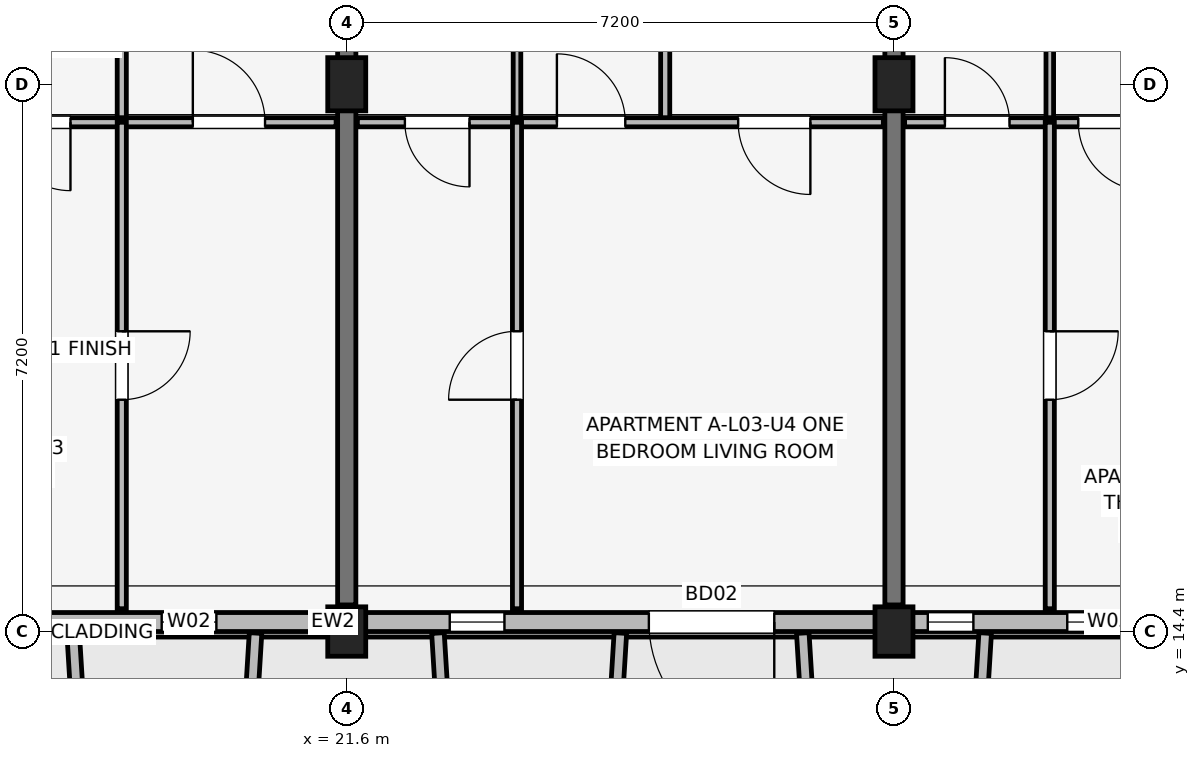
"""IFC4 building model, lengths in metres.
Left out: names, types, materials, properties, quantities, classifications, styles, units other than length and angle.
Written with IfcOpenShell. Run it as: python <this file> out.ifc"""

import sys

from ifc_helpers import new_model, si_unit, direction, frame, frame_2d, origin, origin_2d, place, context, subcontext, project, spatial, rectangle, extrude, element, fill, save


model = new_model("IFC4")
c1 = context("Model", 3, precision=1e-05, world=origin(), true_north=direction((0.0, 1.0)))
c2 = subcontext(c1, "Body", "Model", "MODEL_VIEW")
j1 = project(units=[si_unit("LENGTHUNIT", "METRE"), si_unit("PLANEANGLEUNIT", "RADIAN")], contexts=[c1])
p1 = place(None, origin())
s1 = spatial("IfcSite", under=j1, at=p1, CompositionType="ELEMENT")
p2 = place(p1, origin())
s2 = spatial("IfcBuilding", under=s1, at=p2, CompositionType="ELEMENT")
p3 = place(p2, frame((0.0, 0.0, 11.85)))
s3 = spatial("IfcBuildingStorey", under=s2, at=p3, CompositionType="ELEMENT", Elevation=11.85)
p4 = place(p3, frame((21.6, 14.4, 0.0), z_axis=(0.0, 0.0, 1.0), x_axis=(1.0, 0.0, 0.0)))
e1 = element("IfcColumn", 1, at=p4, inside=s3, PredefinedType="COLUMN", context=c2, shape_type="SweptSolid", body=[
    extrude(rectangle(XDim=0.5, YDim=0.65, at=origin_2d()), origin(), (0.0, 0.0, 1.0), 3.15),
])
p5 = place(p3, frame((21.6, 21.6, 0.0), z_axis=(0.0, 0.0, 1.0), x_axis=(1.0, 0.0, 0.0)))
e2 = element("IfcColumn", 2, at=p5, inside=s3, PredefinedType="COLUMN", context=c2, shape_type="SweptSolid", body=[
    extrude(rectangle(XDim=0.5, YDim=0.7, at=origin_2d()), origin(), (0.0, 0.0, 1.0), 3.15),
])
p6 = place(p3, frame((28.8, 14.4, 0.0), z_axis=(0.0, 0.0, 1.0), x_axis=(1.0, 0.0, 0.0)))
e3 = element("IfcColumn", 3, at=p6, inside=s3, PredefinedType="COLUMN", context=c2, shape_type="SweptSolid", body=[
    extrude(rectangle(XDim=0.5, YDim=0.65, at=origin_2d()), origin(), (0.0, 0.0, 1.0), 3.15),
])
p7 = place(p3, frame((28.8, 21.6, 0.0), z_axis=(0.0, 0.0, 1.0), x_axis=(1.0, 0.0, 0.0)))
e4 = element("IfcColumn", 4, at=p7, inside=s3, PredefinedType="COLUMN", context=c2, shape_type="SweptSolid", body=[
    extrude(rectangle(XDim=0.5, YDim=0.7, at=origin_2d()), origin(), (0.0, 0.0, 1.0), 3.15),
])
for number, where, z_axis, x_axis in (
    (5, (21.6, 14.75, 0.0), (0.0, 0.0, 1.0), (0.0, 1.0, 0.0)),
    (6, (28.8, 14.75, 0.0), (0.0, 0.0, 1.0), (0.0, 1.0, 0.0)),
):
    element("IfcWall", number, at=place(p3, frame(where, z_axis=z_axis, x_axis=x_axis)), inside=s3, PredefinedType="SHEAR", context=c2, shape_type="SweptSolid", body=[
        extrude(rectangle(XDim=9.4, YDim=0.24, at=frame_2d((4.7, 0.0))), origin(), (0.0, 0.0, 1.0), 3.15),
    ])
p8 = place(p3, frame((3.4, 14.525, 0.0), z_axis=(0.0, 0.0, 1.0), x_axis=(1.0, 0.0, 0.0)))
e7 = element("IfcWall", 7, at=p8, inside=s3, PredefinedType="SOLIDWALL", context=c2, shape_type="SweptSolid", body=[
    extrude(rectangle(XDim=29.2, YDim=0.25, at=frame_2d((14.6, 0.0))), origin(), (0.0, 0.0, 1.0), 2.43),
])
p9 = place(p8, frame((9.5, 0.0, 0.0), z_axis=(0.0, 0.0, 1.0), x_axis=(-1.0, 0.0, 0.0)))
e8 = element("IfcOpeningElement", 8, at=p9, cuts=e7, PredefinedType="OPENING", context=c2, shape_type="SweptSolid", body=[
    extrude(rectangle(XDim=1.8, YDim=2.15, at=frame_2d((0.9, 1.075))), frame((0.0, 0.135, 0.0), z_axis=(0.0, -1.0, 0.0), x_axis=(1.0, 0.0, 0.0)), (0.0, 0.0, 1.0), 0.27),
])
p10 = place(p8, frame((23.825, 0.0, 0.0), z_axis=(0.0, 0.0, 1.0), x_axis=(-1.0, 0.0, 0.0)))
e9 = element("IfcOpeningElement", 9, at=p10, cuts=e7, PredefinedType="OPENING", context=c2, shape_type="SweptSolid", body=[
    extrude(rectangle(XDim=1.65, YDim=2.15, at=frame_2d((0.825, 1.075))), frame((0.0, 0.135, 0.0), z_axis=(0.0, -1.0, 0.0), x_axis=(1.0, 0.0, 0.0)), (0.0, 0.0, 1.0), 0.27),
])
p11 = place(p8, frame((2.755, 0.0, 0.75)))
e10 = element("IfcOpeningElement", 10, at=p11, cuts=e7, PredefinedType="OPENING", context=c2, shape_type="SweptSolid", body=[
    extrude(rectangle(XDim=0.6, YDim=1.25, at=frame_2d((0.3, 0.625))), frame((0.0, 0.135, 0.0), z_axis=(0.0, -1.0, 0.0), x_axis=(1.0, 0.0, 0.0)), (0.0, 0.0, 1.0), 0.27),
])
p12 = place(p8, frame((4.245, 0.0, 0.75)))
e11 = element("IfcOpeningElement", 11, at=p12, cuts=e7, PredefinedType="OPENING", context=c2, shape_type="SweptSolid", body=[
    extrude(rectangle(XDim=0.6, YDim=1.25, at=frame_2d((0.3, 0.625))), frame((0.0, 0.135, 0.0), z_axis=(0.0, -1.0, 0.0), x_axis=(1.0, 0.0, 0.0)), (0.0, 0.0, 1.0), 0.27),
])
p13 = place(p8, frame((12.54, 0.0, 0.7)))
e12 = element("IfcOpeningElement", 12, at=p13, cuts=e7, PredefinedType="OPENING", context=c2, shape_type="SweptSolid", body=[
    extrude(rectangle(XDim=1.72, YDim=1.6, at=frame_2d((0.86, 0.8))), frame((0.0, 0.135, 0.0), z_axis=(0.0, -1.0, 0.0), x_axis=(1.0, 0.0, 0.0)), (0.0, 0.0, 1.0), 0.27),
])
p14 = place(p8, frame((15.765, 0.0, 0.75)))
e13 = element("IfcOpeningElement", 13, at=p14, cuts=e7, PredefinedType="OPENING", context=c2, shape_type="SweptSolid", body=[
    extrude(rectangle(XDim=0.72, YDim=1.35, at=frame_2d((0.36, 0.675))), frame((0.0, 0.135, 0.0), z_axis=(0.0, -1.0, 0.0), x_axis=(1.0, 0.0, 0.0)), (0.0, 0.0, 1.0), 0.27),
])
p15 = place(p8, frame((19.555, 0.0, 0.75)))
e14 = element("IfcOpeningElement", 14, at=p15, cuts=e7, PredefinedType="OPENING", context=c2, shape_type="SweptSolid", body=[
    extrude(rectangle(XDim=0.72, YDim=1.35, at=frame_2d((0.36, 0.675))), frame((0.0, 0.135, 0.0), z_axis=(0.0, -1.0, 0.0), x_axis=(1.0, 0.0, 0.0)), (0.0, 0.0, 1.0), 0.27),
])
p16 = place(p8, frame((25.845, 0.0, 0.75)))
e15 = element("IfcOpeningElement", 15, at=p16, cuts=e7, PredefinedType="OPENING", context=c2, shape_type="SweptSolid", body=[
    extrude(rectangle(XDim=0.6, YDim=1.25, at=frame_2d((0.3, 0.625))), frame((0.0, 0.135, 0.0), z_axis=(0.0, -1.0, 0.0), x_axis=(1.0, 0.0, 0.0)), (0.0, 0.0, 1.0), 0.27),
])
p17 = place(p8, frame((27.68, 0.0, 0.75)))
e16 = element("IfcOpeningElement", 16, at=p17, cuts=e7, PredefinedType="OPENING", context=c2, shape_type="SweptSolid", body=[
    extrude(rectangle(XDim=1.1, YDim=1.5, at=frame_2d((0.55, 0.75))), frame((0.0, 0.135, 0.0), z_axis=(0.0, -1.0, 0.0), x_axis=(1.0, 0.0, 0.0)), (0.0, 0.0, 1.0), 0.27),
])
for number, where, z_axis, x_axis in (
    (17, (18.0, 14.38, 0.0), (0.0, 0.0, 1.0), (0.061, -0.998, 0.0)),
    (18, (20.4, 14.38, 0.0), (0.0, 0.0, 1.0), (-0.061, -0.998, 0.0)),
):
    element("IfcWall", number, at=place(p3, frame(where, z_axis=z_axis, x_axis=x_axis)), inside=s3, PredefinedType="ELEMENTEDWALL", context=c2, shape_type="SweptSolid", body=[
        extrude(rectangle(XDim=1.964, YDim=0.165, at=frame_2d((0.982, 0.0))), origin(), (0.0, 0.0, 1.0), 2.45),
    ])
for number, where, z_axis, x_axis in (
    (19, (22.8, 14.38, 0.0), (0.0, 0.0, 1.0), (0.061, -0.998, 0.0)),
    (20, (25.2, 14.38, 0.0), (0.0, 0.0, 1.0), (-0.061, -0.998, 0.0)),
    (21, (27.6, 14.38, 0.0), (0.0, 0.0, 1.0), (0.061, -0.998, 0.0)),
):
    element("IfcWall", number, at=place(p3, frame(where, z_axis=z_axis, x_axis=x_axis)), inside=s3, PredefinedType="ELEMENTEDWALL", context=c2, shape_type="SweptSolid", body=[
        extrude(rectangle(XDim=1.964, YDim=0.165, at=frame_2d((0.982, 0.0))), origin(), (0.0, 0.0, 1.0), 2.53),
    ])
p18 = place(p3, frame((30.0, 14.38, 0.0), z_axis=(0.0, 0.0, 1.0), x_axis=(-0.061170732449, -0.998127317276, 0.0)))
e22 = element("IfcWall", 22, at=p18, inside=s3, PredefinedType="ELEMENTEDWALL", context=c2, shape_type="SweptSolid", body=[
    extrude(rectangle(XDim=1.964, YDim=0.165, at=frame_2d((0.982, 0.0))), origin(), (0.0, 0.0, 1.0), 2.95),
])
p19 = place(p3, frame((18.64, 21.1, 0.0), z_axis=(0.0, 0.0, 1.0), x_axis=(0.0, 1.0, 0.0)))
e23 = element("IfcWall", 23, at=p19, inside=s3, PredefinedType="PARTITIONING", context=c2, shape_type="SweptSolid", body=[
    extrude(rectangle(XDim=3.2, YDim=0.12, at=frame_2d((1.6, 0.0))), origin(), (0.0, 0.0, 1.0), 2.375),
])
p20 = place(p3, frame((14.54, 21.1, 0.0), z_axis=(0.0, 0.0, 1.0), x_axis=(1.0, 0.0, 0.0)))
e24 = element("IfcWall", 24, at=p20, inside=s3, PredefinedType="PARTITIONING", context=c2, shape_type="SweptSolid", body=[
    extrude(rectangle(XDim=6.92, YDim=0.12, at=frame_2d((3.46, 0.0))), origin(), (0.0, 0.0, 1.0), 2.38),
])
p21 = place(p20, frame((0.5, 0.0, 0.0)))
e25 = element("IfcOpeningElement", 25, at=p21, cuts=e24, PredefinedType="OPENING", context=c2, shape_type="SweptSolid", body=[
    extrude(rectangle(XDim=0.85, YDim=2.08, at=frame_2d((0.425, 1.04))), frame((0.0, 0.07, 0.0), z_axis=(0.0, -1.0, 0.0), x_axis=(1.0, 0.0, 0.0)), (0.0, 0.0, 1.0), 0.14),
])
p22 = place(p20, frame((3.425, 0.0, 0.0), z_axis=(0.0, 0.0, 1.0), x_axis=(-1.0, 0.0, 0.0)))
e26 = element("IfcOpeningElement", 26, at=p22, cuts=e24, PredefinedType="OPENING", context=c2, shape_type="SweptSolid", body=[
    extrude(rectangle(XDim=0.9, YDim=2.08, at=frame_2d((0.45, 1.04))), frame((0.0, 0.07, 0.0), z_axis=(0.0, -1.0, 0.0), x_axis=(1.0, 0.0, 0.0)), (0.0, 0.0, 1.0), 0.14),
])
p23 = place(p20, frame((5.035, 0.0, 0.0)))
e27 = element("IfcOpeningElement", 27, at=p23, cuts=e24, PredefinedType="OPENING", context=c2, shape_type="SweptSolid", body=[
    extrude(rectangle(XDim=0.95, YDim=2.08, at=frame_2d((0.475, 1.04))), frame((0.0, 0.07, 0.0), z_axis=(0.0, -1.0, 0.0), x_axis=(1.0, 0.0, 0.0)), (0.0, 0.0, 1.0), 0.14),
])
p24 = place(p3, frame((18.64, 14.7, 0.0), z_axis=(0.0, 0.0, 1.0), x_axis=(0.0, 1.0, 0.0)))
e28 = element("IfcWall", 28, at=p24, inside=s3, PredefinedType="PARTITIONING", context=c2, shape_type="SweptSolid", body=[
    extrude(rectangle(XDim=6.4, YDim=0.12, at=frame_2d((3.2, 0.0))), origin(), (0.0, 0.0, 1.0), 2.38),
])
p25 = place(p24, frame((3.65, 0.0, 0.0), z_axis=(0.0, 0.0, 1.0), x_axis=(-1.0, 0.0, 0.0)))
e29 = element("IfcOpeningElement", 29, at=p25, cuts=e28, PredefinedType="OPENING", context=c2, shape_type="SweptSolid", body=[
    extrude(rectangle(XDim=0.9, YDim=2.08, at=frame_2d((0.45, 1.04))), frame((0.0, 0.07, 0.0), z_axis=(0.0, -1.0, 0.0), x_axis=(1.0, 0.0, 0.0)), (0.0, 0.0, 1.0), 0.14),
])
p26 = place(p3, frame((23.84, 21.1, 0.0), z_axis=(0.0, 0.0, 1.0), x_axis=(0.0, 1.0, 0.0)))
e30 = element("IfcWall", 30, at=p26, inside=s3, PredefinedType="PARTITIONING", context=c2, shape_type="SweptSolid", body=[
    extrude(rectangle(XDim=3.2, YDim=0.1, at=frame_2d((1.6, 0.0))), origin(), (0.0, 0.0, 1.0), 2.375),
])
p27 = place(p3, frame((25.79, 21.1, 0.0), z_axis=(0.0, 0.0, 1.0), x_axis=(0.0, 1.0, 0.0)))
e31 = element("IfcWall", 31, at=p27, inside=s3, PredefinedType="PARTITIONING", context=c2, shape_type="SweptSolid", body=[
    extrude(rectangle(XDim=3.2, YDim=0.12, at=frame_2d((1.6, 0.0))), origin(), (0.0, 0.0, 1.0), 2.375),
])
p28 = place(p3, frame((21.74, 21.1, 0.0), z_axis=(0.0, 0.0, 1.0), x_axis=(1.0, 0.0, 0.0)))
e32 = element("IfcWall", 32, at=p28, inside=s3, PredefinedType="PARTITIONING", context=c2, shape_type="SweptSolid", body=[
    extrude(rectangle(XDim=6.92, YDim=0.12, at=frame_2d((3.46, 0.0))), origin(), (0.0, 0.0, 1.0), 2.38),
])
p29 = place(p28, frame((1.475, 0.0, 0.0), z_axis=(0.0, 0.0, 1.0), x_axis=(-1.0, 0.0, 0.0)))
e33 = element("IfcOpeningElement", 33, at=p29, cuts=e32, PredefinedType="OPENING", context=c2, shape_type="SweptSolid", body=[
    extrude(rectangle(XDim=0.85, YDim=2.08, at=frame_2d((0.425, 1.04))), frame((0.0, 0.07, 0.0), z_axis=(0.0, -1.0, 0.0), x_axis=(1.0, 0.0, 0.0)), (0.0, 0.0, 1.0), 0.14),
])
p30 = place(p28, frame((2.625, 0.0, 0.0)))
e34 = element("IfcOpeningElement", 34, at=p30, cuts=e32, PredefinedType="OPENING", context=c2, shape_type="SweptSolid", body=[
    extrude(rectangle(XDim=0.9, YDim=2.08, at=frame_2d((0.45, 1.04))), frame((0.0, 0.07, 0.0), z_axis=(0.0, -1.0, 0.0), x_axis=(1.0, 0.0, 0.0)), (0.0, 0.0, 1.0), 0.14),
])
p31 = place(p28, frame((5.96, 0.0, 0.0), z_axis=(0.0, 0.0, 1.0), x_axis=(-1.0, 0.0, 0.0)))
e35 = element("IfcOpeningElement", 35, at=p31, cuts=e32, PredefinedType="OPENING", context=c2, shape_type="SweptSolid", body=[
    extrude(rectangle(XDim=0.95, YDim=2.08, at=frame_2d((0.475, 1.04))), frame((0.0, 0.07, 0.0), z_axis=(0.0, -1.0, 0.0), x_axis=(1.0, 0.0, 0.0)), (0.0, 0.0, 1.0), 0.14),
])
p32 = place(p3, frame((23.84, 14.7, 0.0), z_axis=(0.0, 0.0, 1.0), x_axis=(0.0, 1.0, 0.0)))
e36 = element("IfcWall", 36, at=p32, inside=s3, PredefinedType="PARTITIONING", context=c2, shape_type="SweptSolid", body=[
    extrude(rectangle(XDim=6.4, YDim=0.12, at=frame_2d((3.2, 0.0))), origin(), (0.0, 0.0, 1.0), 2.38),
])
p33 = place(p32, frame((2.75, 0.0, 0.0)))
e37 = element("IfcOpeningElement", 37, at=p33, cuts=e36, PredefinedType="OPENING", context=c2, shape_type="SweptSolid", body=[
    extrude(rectangle(XDim=0.9, YDim=2.08, at=frame_2d((0.45, 1.04))), frame((0.0, 0.07, 0.0), z_axis=(0.0, -1.0, 0.0), x_axis=(1.0, 0.0, 0.0)), (0.0, 0.0, 1.0), 0.14),
])
p34 = place(p3, frame((30.85, 21.1, 0.0), z_axis=(0.0, 0.0, 1.0), x_axis=(0.0, 1.0, 0.0)))
e38 = element("IfcWall", 38, at=p34, inside=s3, PredefinedType="PARTITIONING", context=c2, shape_type="SweptSolid", body=[
    extrude(rectangle(XDim=3.2, YDim=0.1, at=frame_2d((1.6, 0.0))), origin(), (0.0, 0.0, 1.0), 2.375),
])
p35 = place(p3, frame((28.94, 21.1, 0.0), z_axis=(0.0, 0.0, 1.0), x_axis=(1.0, 0.0, 0.0)))
e39 = element("IfcWall", 39, at=p35, inside=s3, PredefinedType="PARTITIONING", context=c2, shape_type="SweptSolid", body=[
    extrude(rectangle(XDim=6.92, YDim=0.12, at=frame_2d((3.46, 0.0))), origin(), (0.0, 0.0, 1.0), 2.38),
])
p36 = place(p35, frame((0.53, 0.0, 0.0)))
e40 = element("IfcOpeningElement", 40, at=p36, cuts=e39, PredefinedType="OPENING", context=c2, shape_type="SweptSolid", body=[
    extrude(rectangle(XDim=0.85, YDim=2.08, at=frame_2d((0.425, 1.04))), frame((0.0, 0.07, 0.0), z_axis=(0.0, -1.0, 0.0), x_axis=(1.0, 0.0, 0.0)), (0.0, 0.0, 1.0), 0.14),
])
p37 = place(p35, frame((3.185, 0.0, 0.0), z_axis=(0.0, 0.0, 1.0), x_axis=(-1.0, 0.0, 0.0)))
e41 = element("IfcOpeningElement", 41, at=p37, cuts=e39, PredefinedType="OPENING", context=c2, shape_type="SweptSolid", body=[
    extrude(rectangle(XDim=0.9, YDim=2.08, at=frame_2d((0.45, 1.04))), frame((0.0, 0.07, 0.0), z_axis=(0.0, -1.0, 0.0), x_axis=(1.0, 0.0, 0.0)), (0.0, 0.0, 1.0), 0.14),
])
p38 = place(p35, frame((3.91, 0.0, 0.0)))
e42 = element("IfcOpeningElement", 42, at=p38, cuts=e39, PredefinedType="OPENING", context=c2, shape_type="SweptSolid", body=[
    extrude(rectangle(XDim=0.95, YDim=2.08, at=frame_2d((0.475, 1.04))), frame((0.0, 0.07, 0.0), z_axis=(0.0, -1.0, 0.0), x_axis=(1.0, 0.0, 0.0)), (0.0, 0.0, 1.0), 0.14),
])
p39 = place(p3, frame((30.85, 14.7, 0.0), z_axis=(0.0, 0.0, 1.0), x_axis=(0.0, 1.0, 0.0)))
e43 = element("IfcWall", 43, at=p39, inside=s3, PredefinedType="PARTITIONING", context=c2, shape_type="SweptSolid", body=[
    extrude(rectangle(XDim=6.4, YDim=0.12, at=frame_2d((3.2, 0.0))), origin(), (0.0, 0.0, 1.0), 2.38),
])
p40 = place(p39, frame((3.65, 0.0, 0.0), z_axis=(0.0, 0.0, 1.0), x_axis=(-1.0, 0.0, 0.0)))
e44 = element("IfcOpeningElement", 44, at=p40, cuts=e43, PredefinedType="OPENING", context=c2, shape_type="SweptSolid", body=[
    extrude(rectangle(XDim=0.9, YDim=2.08, at=frame_2d((0.45, 1.04))), frame((0.0, 0.07, 0.0), z_axis=(0.0, -1.0, 0.0), x_axis=(1.0, 0.0, 0.0)), (0.0, 0.0, 1.0), 0.14),
])
p41 = place(p10, origin())
e45 = element("IfcDoor", 45, at=p41, inside=s3, OperationType="SINGLE_SWING_RIGHT", PredefinedType="DOOR", context=c2, shape_type="SweptSolid", body=[
    extrude(rectangle(XDim=1.65, YDim=2.15, at=frame_2d((0.825, 1.075))), frame((0.0, 0.025, 0.0), z_axis=(0.0, -1.0, 0.0), x_axis=(1.0, 0.0, 0.0)), (0.0, 0.0, 1.0), 0.05),
])
fill(e9, e45)
p42 = place(p14, origin())
e46 = element("IfcWindow", 46, at=p42, inside=s3, PartitioningType="SINGLE_PANEL", PredefinedType="WINDOW", context=c2, shape_type="SweptSolid", body=[
    extrude(rectangle(XDim=0.72, YDim=1.35, at=frame_2d((0.36, 0.675))), frame((0.0, 0.03, 0.0), z_axis=(0.0, -1.0, 0.0), x_axis=(1.0, 0.0, 0.0)), (0.0, 0.0, 1.0), 0.06),
])
fill(e13, e46)
p43 = place(p15, origin())
e47 = element("IfcWindow", 47, at=p43, inside=s3, PartitioningType="SINGLE_PANEL", PredefinedType="WINDOW", context=c2, shape_type="SweptSolid", body=[
    extrude(rectangle(XDim=0.72, YDim=1.35, at=frame_2d((0.36, 0.675))), frame((0.0, 0.03, 0.0), z_axis=(0.0, -1.0, 0.0), x_axis=(1.0, 0.0, 0.0)), (0.0, 0.0, 1.0), 0.06),
])
fill(e14, e47)
p44 = place(p16, origin())
e48 = element("IfcWindow", 48, at=p44, inside=s3, PartitioningType="SINGLE_PANEL", PredefinedType="WINDOW", context=c2, shape_type="SweptSolid", body=[
    extrude(rectangle(XDim=0.6, YDim=1.25, at=frame_2d((0.3, 0.625))), frame((0.0, 0.03, 0.0), z_axis=(0.0, -1.0, 0.0), x_axis=(1.0, 0.0, 0.0)), (0.0, 0.0, 1.0), 0.06),
])
fill(e15, e48)
p45 = place(p17, origin())
e49 = element("IfcWindow", 49, at=p45, inside=s3, PartitioningType="SINGLE_PANEL", PredefinedType="WINDOW", context=c2, shape_type="SweptSolid", body=[
    extrude(rectangle(XDim=1.1, YDim=1.5, at=frame_2d((0.55, 0.75))), frame((0.0, 0.03, 0.0), z_axis=(0.0, -1.0, 0.0), x_axis=(1.0, 0.0, 0.0)), (0.0, 0.0, 1.0), 0.06),
])
fill(e16, e49)
p46 = place(p22, origin())
e50 = element("IfcDoor", 50, at=p46, inside=s3, OperationType="SINGLE_SWING_RIGHT", PredefinedType="DOOR", context=c2, shape_type="SweptSolid", body=[
    extrude(rectangle(XDim=0.9, YDim=2.08, at=frame_2d((0.45, 1.04))), frame((0.0, 0.025, 0.0), z_axis=(0.0, -1.0, 0.0), x_axis=(1.0, 0.0, 0.0)), (0.0, 0.0, 1.0), 0.05),
])
fill(e26, e50)
p47 = place(p23, origin())
e51 = element("IfcDoor", 51, at=p47, inside=s3, OperationType="SINGLE_SWING_LEFT", PredefinedType="DOOR", context=c2, shape_type="SweptSolid", body=[
    extrude(rectangle(XDim=0.95, YDim=2.08, at=frame_2d((0.475, 1.04))), frame((0.0, 0.025, 0.0), z_axis=(0.0, -1.0, 0.0), x_axis=(1.0, 0.0, 0.0)), (0.0, 0.0, 1.0), 0.05),
])
fill(e27, e51)
p48 = place(p25, origin())
e52 = element("IfcDoor", 52, at=p48, inside=s3, OperationType="SINGLE_SWING_RIGHT", PredefinedType="DOOR", context=c2, shape_type="SweptSolid", body=[
    extrude(rectangle(XDim=0.9, YDim=2.08, at=frame_2d((0.45, 1.04))), frame((0.0, 0.025, 0.0), z_axis=(0.0, -1.0, 0.0), x_axis=(1.0, 0.0, 0.0)), (0.0, 0.0, 1.0), 0.05),
])
fill(e29, e52)
p49 = place(p29, origin())
e53 = element("IfcDoor", 53, at=p49, inside=s3, OperationType="SINGLE_SWING_RIGHT", PredefinedType="DOOR", context=c2, shape_type="SweptSolid", body=[
    extrude(rectangle(XDim=0.85, YDim=2.08, at=frame_2d((0.425, 1.04))), frame((0.0, 0.025, 0.0), z_axis=(0.0, -1.0, 0.0), x_axis=(1.0, 0.0, 0.0)), (0.0, 0.0, 1.0), 0.05),
])
fill(e33, e53)
p50 = place(p30, origin())
e54 = element("IfcDoor", 54, at=p50, inside=s3, OperationType="SINGLE_SWING_LEFT", PredefinedType="DOOR", context=c2, shape_type="SweptSolid", body=[
    extrude(rectangle(XDim=0.9, YDim=2.08, at=frame_2d((0.45, 1.04))), frame((0.0, 0.025, 0.0), z_axis=(0.0, -1.0, 0.0), x_axis=(1.0, 0.0, 0.0)), (0.0, 0.0, 1.0), 0.05),
])
fill(e34, e54)
p51 = place(p31, origin())
e55 = element("IfcDoor", 55, at=p51, inside=s3, OperationType="SINGLE_SWING_RIGHT", PredefinedType="DOOR", context=c2, shape_type="SweptSolid", body=[
    extrude(rectangle(XDim=0.95, YDim=2.08, at=frame_2d((0.475, 1.04))), frame((0.0, 0.025, 0.0), z_axis=(0.0, -1.0, 0.0), x_axis=(1.0, 0.0, 0.0)), (0.0, 0.0, 1.0), 0.05),
])
fill(e35, e55)
p52 = place(p33, origin())
e56 = element("IfcDoor", 56, at=p52, inside=s3, OperationType="SINGLE_SWING_LEFT", PredefinedType="DOOR", context=c2, shape_type="SweptSolid", body=[
    extrude(rectangle(XDim=0.9, YDim=2.08, at=frame_2d((0.45, 1.04))), frame((0.0, 0.025, 0.0), z_axis=(0.0, -1.0, 0.0), x_axis=(1.0, 0.0, 0.0)), (0.0, 0.0, 1.0), 0.05),
])
fill(e37, e56)
p53 = place(p36, origin())
e57 = element("IfcDoor", 57, at=p53, inside=s3, OperationType="SINGLE_SWING_LEFT", PredefinedType="DOOR", context=c2, shape_type="SweptSolid", body=[
    extrude(rectangle(XDim=0.85, YDim=2.08, at=frame_2d((0.425, 1.04))), frame((0.0, 0.025, 0.0), z_axis=(0.0, -1.0, 0.0), x_axis=(1.0, 0.0, 0.0)), (0.0, 0.0, 1.0), 0.05),
])
fill(e40, e57)
p54 = place(p37, origin())
e58 = element("IfcDoor", 58, at=p54, inside=s3, OperationType="SINGLE_SWING_RIGHT", PredefinedType="DOOR", context=c2, shape_type="SweptSolid", body=[
    extrude(rectangle(XDim=0.9, YDim=2.08, at=frame_2d((0.45, 1.04))), frame((0.0, 0.025, 0.0), z_axis=(0.0, -1.0, 0.0), x_axis=(1.0, 0.0, 0.0)), (0.0, 0.0, 1.0), 0.05),
])
fill(e41, e58)
p55 = place(p40, origin())
e59 = element("IfcDoor", 59, at=p55, inside=s3, OperationType="SINGLE_SWING_RIGHT", PredefinedType="DOOR", context=c2, shape_type="SweptSolid", body=[
    extrude(rectangle(XDim=0.9, YDim=2.08, at=frame_2d((0.45, 1.04))), frame((0.0, 0.025, 0.0), z_axis=(0.0, -1.0, 0.0), x_axis=(1.0, 0.0, 0.0)), (0.0, 0.0, 1.0), 0.05),
])
fill(e44, e59)
save(model, sys.argv[1])
